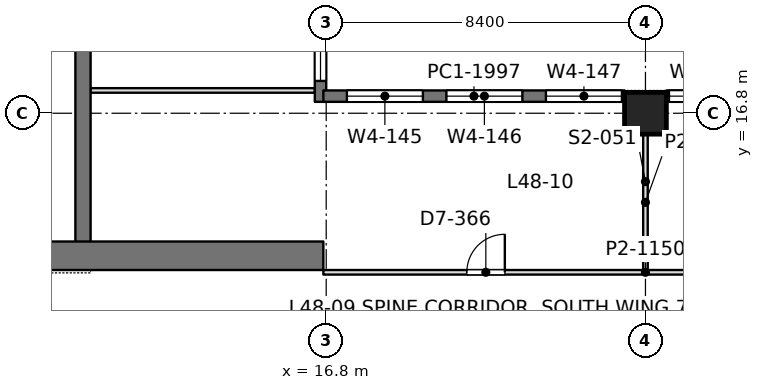
"""IFC4 building model, lengths in metres.
Left out: names, types, materials, properties, quantities, classifications, styles, units other than length and angle.
Written with IfcOpenShell. Run it as: python <this file> out.ifc"""

import sys

from ifc_helpers import new_model, si_unit, direction, frame, frame_2d, origin, origin_2d, place, context, subcontext, project, spatial, rectangle, extrude, element, fill, save


model = new_model("IFC4")
c1 = context("Model", 3, precision=1e-05, world=origin(), true_north=direction((0.0, 1.0)))
c2 = subcontext(c1, "Body", "Model", "MODEL_VIEW")
j1 = project(units=[si_unit("LENGTHUNIT", "METRE"), si_unit("PLANEANGLEUNIT", "RADIAN")], contexts=[c1])
p1 = place(None, origin())
s1 = spatial("IfcSite", under=j1, at=p1, CompositionType="ELEMENT")
p2 = place(p1, origin())
s2 = spatial("IfcBuilding", under=s1, at=p2, CompositionType="ELEMENT")
p3 = place(p2, frame((0.0, 0.0, 211.2)))
s3 = spatial("IfcBuildingStorey", under=s2, at=p3, CompositionType="ELEMENT", Elevation=211.2)
p4 = place(p3, frame((25.2, 16.8, 0.0), z_axis=(0.0, 0.0, 1.0), x_axis=(1.0, 0.0, 0.0)))
e1 = element("IfcColumn", 1, at=p4, inside=s3, PredefinedType="COLUMN", context=c2, shape_type="SweptSolid", body=[
    extrude(rectangle(XDim=1.1, YDim=1.1, at=origin_2d()), origin(), (0.0, 0.0, 1.0), 4.2),
])
p5 = place(p3, frame((-1.125, 13.05, 0.0), z_axis=(0.0, 0.0, 1.0), x_axis=(1.0, 0.0, 0.0)))
e2 = element("IfcWall", 2, at=p5, inside=s3, PredefinedType="SHEAR", context=c2, shape_type="SweptSolid", body=[
    extrude(rectangle(XDim=17.85, YDim=0.75, at=frame_2d((8.925, 0.0))), origin(), (0.0, 0.0, 1.0), 4.2),
])
p6 = place(p5, frame((8.875, 0.0, 0.0)))
e3 = element("IfcOpeningElement", 3, at=p6, cuts=e2, PredefinedType="OPENING", context=c2, shape_type="SweptSolid", body=[
    extrude(rectangle(XDim=1.8, YDim=2.4, at=frame_2d((0.9, 1.2))), frame((0.0, 0.385, 0.0), z_axis=(0.0, -1.0, 0.0), x_axis=(1.0, 0.0, 0.0)), (0.0, 0.0, 1.0), 0.77),
])
p7 = place(p3, frame((10.4, 13.05, 0.0), z_axis=(0.0, 0.0, 1.0), x_axis=(0.0, 1.0, 0.0)))
e4 = element("IfcWall", 4, at=p7, inside=s3, PredefinedType="SHEAR", context=c2, shape_type="SweptSolid", body=[
    extrude(rectangle(XDim=24.3, YDim=0.4, at=frame_2d((12.15, 0.0))), origin(), (0.0, 0.0, 1.0), 4.2),
])
p8 = place(p7, frame((15.75, 0.0, 0.0)))
e5 = element("IfcOpeningElement", 5, at=p8, cuts=e4, PredefinedType="OPENING", context=c2, shape_type="SweptSolid", body=[
    extrude(rectangle(XDim=1.1, YDim=2.2, at=frame_2d((0.55, 1.1))), frame((0.0, 0.21, 0.0), z_axis=(0.0, -1.0, 0.0), x_axis=(1.0, 0.0, 0.0)), (0.0, 0.0, 1.0), 0.42),
])
p9 = place(p7, frame((18.6, 0.0, 0.0)))
e6 = element("IfcOpeningElement", 6, at=p9, cuts=e4, PredefinedType="OPENING", context=c2, shape_type="SweptSolid", body=[
    extrude(rectangle(XDim=1.1, YDim=2.2, at=frame_2d((0.55, 1.1))), frame((0.0, 0.21, 0.0), z_axis=(0.0, -1.0, 0.0), x_axis=(1.0, 0.0, 0.0)), (0.0, 0.0, 1.0), 0.42),
])
p10 = place(p7, frame((21.45, 0.0, 0.0)))
e7 = element("IfcOpeningElement", 7, at=p10, cuts=e4, PredefinedType="OPENING", context=c2, shape_type="SweptSolid", body=[
    extrude(rectangle(XDim=1.1, YDim=2.2, at=frame_2d((0.55, 1.1))), frame((0.0, 0.21, 0.0), z_axis=(0.0, -1.0, 0.0), x_axis=(1.0, 0.0, 0.0)), (0.0, 0.0, 1.0), 0.42),
])
p11 = place(p7, frame((6.05, 0.0, 0.0)))
e8 = element("IfcOpeningElement", 8, at=p11, cuts=e4, PredefinedType="OPENING", context=c2, shape_type="SweptSolid", body=[
    extrude(rectangle(XDim=1.8, YDim=2.4, at=frame_2d((0.9, 1.2))), frame((0.0, 0.21, 0.0), z_axis=(0.0, -1.0, 0.0), x_axis=(1.0, 0.0, 0.0)), (0.0, 0.0, 1.0), 0.42),
])
p12 = place(p7, frame((11.25, 0.0, 0.0)))
e9 = element("IfcOpeningElement", 9, at=p12, cuts=e4, PredefinedType="OPENING", context=c2, shape_type="SweptSolid", body=[
    extrude(rectangle(XDim=1.8, YDim=2.4, at=frame_2d((0.9, 1.2))), frame((0.0, 0.21, 0.0), z_axis=(0.0, -1.0, 0.0), x_axis=(1.0, 0.0, 0.0)), (0.0, 0.0, 1.0), 0.42),
])
p13 = place(p3, frame((16.65, 17.1, 0.0), z_axis=(0.0, 0.0, 1.0), x_axis=(0.0, 1.0, 0.0)))
e10 = element("IfcWall", 10, at=p13, inside=s3, PredefinedType="SOLIDWALL", context=c2, shape_type="SweptSolid", body=[
    extrude(rectangle(XDim=10.7, YDim=0.3, at=frame_2d((5.35, 0.0))), origin(), (0.0, 0.0, 1.0), 4.05),
])
p14 = place(p13, frame((0.55, 0.0, 0.9)))
e11 = element("IfcOpeningElement", 11, at=p14, cuts=e10, PredefinedType="OPENING", context=c2, shape_type="SweptSolid", body=[
    extrude(rectangle(XDim=2.0, YDim=1.9, at=frame_2d((1.0, 0.95))), frame((0.0, 0.16, 0.0), z_axis=(0.0, -1.0, 0.0), x_axis=(1.0, 0.0, 0.0)), (0.0, 0.0, 1.0), 0.32),
])
p15 = place(p13, frame((2.9, 0.0, 0.9)))
e12 = element("IfcOpeningElement", 12, at=p15, cuts=e10, PredefinedType="OPENING", context=c2, shape_type="SweptSolid", body=[
    extrude(rectangle(XDim=2.0, YDim=1.9, at=frame_2d((1.0, 0.95))), frame((0.0, 0.16, 0.0), z_axis=(0.0, -1.0, 0.0), x_axis=(1.0, 0.0, 0.0)), (0.0, 0.0, 1.0), 0.32),
])
p16 = place(p13, frame((7.675, 0.0, 0.9)))
e13 = element("IfcOpeningElement", 13, at=p16, cuts=e10, PredefinedType="OPENING", context=c2, shape_type="SweptSolid", body=[
    extrude(rectangle(XDim=2.0, YDim=1.9, at=frame_2d((1.0, 0.95))), frame((0.0, 0.16, 0.0), z_axis=(0.0, -1.0, 0.0), x_axis=(1.0, 0.0, 0.0)), (0.0, 0.0, 1.0), 0.32),
])
p17 = place(p3, frame((16.725, 17.25, 0.0), z_axis=(0.0, 0.0, 1.0), x_axis=(1.0, 0.0, 0.0)))
e14 = element("IfcWall", 14, at=p17, inside=s3, PredefinedType="SOLIDWALL", context=c2, shape_type="SweptSolid", body=[
    extrude(rectangle(XDim=7.925, YDim=0.3, at=frame_2d((3.962, 0.0))), origin(), (0.0, 0.0, 1.0), 4.05),
])
p18 = place(p17, frame((0.619, 0.0, 0.9)))
e15 = element("IfcOpeningElement", 15, at=p18, cuts=e14, PredefinedType="OPENING", context=c2, shape_type="SweptSolid", body=[
    extrude(rectangle(XDim=2.0, YDim=1.9, at=frame_2d((1.0, 0.95))), frame((0.0, 0.16, 0.0), z_axis=(0.0, -1.0, 0.0), x_axis=(1.0, 0.0, 0.0)), (0.0, 0.0, 1.0), 0.32),
])
p19 = place(p17, frame((3.238, 0.0, 0.9)))
e16 = element("IfcOpeningElement", 16, at=p19, cuts=e14, PredefinedType="OPENING", context=c2, shape_type="SweptSolid", body=[
    extrude(rectangle(XDim=2.0, YDim=1.9, at=frame_2d((1.0, 0.95))), frame((0.0, 0.16, 0.0), z_axis=(0.0, -1.0, 0.0), x_axis=(1.0, 0.0, 0.0)), (0.0, 0.0, 1.0), 0.32),
])
p20 = place(p17, frame((5.856, 0.0, 0.9)))
e17 = element("IfcOpeningElement", 17, at=p20, cuts=e14, PredefinedType="OPENING", context=c2, shape_type="SweptSolid", body=[
    extrude(rectangle(XDim=2.0, YDim=1.9, at=frame_2d((1.0, 0.95))), frame((0.0, 0.16, 0.0), z_axis=(0.0, -1.0, 0.0), x_axis=(1.0, 0.0, 0.0)), (0.0, 0.0, 1.0), 0.32),
])
p21 = place(p3, frame((25.75, 17.25, 0.0), z_axis=(0.0, 0.0, 1.0), x_axis=(1.0, 0.0, 0.0)))
e18 = element("IfcWall", 18, at=p21, inside=s3, PredefinedType="SOLIDWALL", context=c2, shape_type="SweptSolid", body=[
    extrude(rectangle(XDim=7.925, YDim=0.3, at=frame_2d((3.962, 0.0))), origin(), (0.0, 0.0, 1.0), 4.05),
])
p22 = place(p21, frame((0.069, 0.0, 0.9)))
e19 = element("IfcOpeningElement", 19, at=p22, cuts=e18, PredefinedType="OPENING", context=c2, shape_type="SweptSolid", body=[
    extrude(rectangle(XDim=2.0, YDim=1.9, at=frame_2d((1.0, 0.95))), frame((0.0, 0.16, 0.0), z_axis=(0.0, -1.0, 0.0), x_axis=(1.0, 0.0, 0.0)), (0.0, 0.0, 1.0), 0.32),
])
p23 = place(p21, frame((2.688, 0.0, 0.9)))
e20 = element("IfcOpeningElement", 20, at=p23, cuts=e18, PredefinedType="OPENING", context=c2, shape_type="SweptSolid", body=[
    extrude(rectangle(XDim=2.0, YDim=1.9, at=frame_2d((1.0, 0.95))), frame((0.0, 0.16, 0.0), z_axis=(0.0, -1.0, 0.0), x_axis=(1.0, 0.0, 0.0)), (0.0, 0.0, 1.0), 0.32),
])
p24 = place(p21, frame((5.306, 0.0, 0.9)))
e21 = element("IfcOpeningElement", 21, at=p24, cuts=e18, PredefinedType="OPENING", context=c2, shape_type="SweptSolid", body=[
    extrude(rectangle(XDim=2.0, YDim=1.9, at=frame_2d((1.0, 0.95))), frame((0.0, 0.16, 0.0), z_axis=(0.0, -1.0, 0.0), x_axis=(1.0, 0.0, 0.0)), (0.0, 0.0, 1.0), 0.32),
])
p25 = place(p3, frame((10.598, 17.4, 0.0), z_axis=(0.0, 0.0, 1.0), x_axis=(1.0, 0.0, 0.0)))
e22 = element("IfcWall", 22, at=p25, inside=s3, PredefinedType="PARTITIONING", context=c2, shape_type="SweptSolid", body=[
    extrude(rectangle(XDim=5.904, YDim=0.12, at=frame_2d((2.952, 0.0))), origin(), (0.0, 0.0, 1.0), 3.55),
])
p26 = place(p3, frame((25.2, 12.658, 0.0), z_axis=(0.0, 0.0, 1.0), x_axis=(0.0, 1.0, 0.0)))
e23 = element("IfcWall", 23, at=p26, inside=s3, PredefinedType="PARTITIONING", context=c2, shape_type="SweptSolid", body=[
    extrude(rectangle(XDim=3.593, YDim=0.12, at=frame_2d((1.796, 0.0))), origin(), (0.0, 0.0, 1.0), 3.55),
])
p27 = place(p3, frame((16.725, 12.615, 0.0), z_axis=(0.0, 0.0, 1.0), x_axis=(1.0, 0.0, 0.0)))
e24 = element("IfcWall", 24, at=p27, inside=s3, PredefinedType="PARTITIONING", context=c2, shape_type="SweptSolid", body=[
    extrude(rectangle(XDim=16.95, YDim=0.12, at=frame_2d((8.475, 0.0))), origin(), (0.0, 0.0, 1.0), 3.55),
])
p28 = place(p27, frame((3.775, 0.0, 0.0)))
e25 = element("IfcOpeningElement", 25, at=p28, cuts=e24, PredefinedType="OPENING", context=c2, shape_type="SweptSolid", body=[
    extrude(rectangle(XDim=1.0, YDim=2.4, at=frame_2d((0.5, 1.2))), frame((0.0, 0.07, 0.0), z_axis=(0.0, -1.0, 0.0), x_axis=(1.0, 0.0, 0.0)), (0.0, 0.0, 1.0), 0.14),
])
p29 = place(p27, frame((12.175, 0.0, 0.0)))
e26 = element("IfcOpeningElement", 26, at=p29, cuts=e24, PredefinedType="OPENING", context=c2, shape_type="SweptSolid", body=[
    extrude(rectangle(XDim=1.0, YDim=2.4, at=frame_2d((0.5, 1.2))), frame((0.0, 0.07, 0.0), z_axis=(0.0, -1.0, 0.0), x_axis=(1.0, 0.0, 0.0)), (0.0, 0.0, 1.0), 0.14),
])
p30 = place(p14, origin())
e27 = element("IfcWindow", 27, at=p30, inside=s3, PartitioningType="SINGLE_PANEL", PredefinedType="WINDOW", context=c2, shape_type="SweptSolid", body=[
    extrude(rectangle(XDim=2.0, YDim=1.9, at=frame_2d((1.0, 0.95))), frame((0.0, 0.03, 0.0), z_axis=(0.0, -1.0, 0.0), x_axis=(1.0, 0.0, 0.0)), (0.0, 0.0, 1.0), 0.06),
])
fill(e11, e27)
p31 = place(p18, origin())
e28 = element("IfcWindow", 28, at=p31, inside=s3, PartitioningType="SINGLE_PANEL", PredefinedType="WINDOW", context=c2, shape_type="SweptSolid", body=[
    extrude(rectangle(XDim=2.0, YDim=1.9, at=frame_2d((1.0, 0.95))), frame((0.0, 0.03, 0.0), z_axis=(0.0, -1.0, 0.0), x_axis=(1.0, 0.0, 0.0)), (0.0, 0.0, 1.0), 0.06),
])
fill(e15, e28)
p32 = place(p19, origin())
e29 = element("IfcWindow", 29, at=p32, inside=s3, PartitioningType="SINGLE_PANEL", PredefinedType="WINDOW", context=c2, shape_type="SweptSolid", body=[
    extrude(rectangle(XDim=2.0, YDim=1.9, at=frame_2d((1.0, 0.95))), frame((0.0, 0.03, 0.0), z_axis=(0.0, -1.0, 0.0), x_axis=(1.0, 0.0, 0.0)), (0.0, 0.0, 1.0), 0.06),
])
fill(e16, e29)
p33 = place(p20, origin())
e30 = element("IfcWindow", 30, at=p33, inside=s3, PartitioningType="SINGLE_PANEL", PredefinedType="WINDOW", context=c2, shape_type="SweptSolid", body=[
    extrude(rectangle(XDim=2.0, YDim=1.9, at=frame_2d((1.0, 0.95))), frame((0.0, 0.03, 0.0), z_axis=(0.0, -1.0, 0.0), x_axis=(1.0, 0.0, 0.0)), (0.0, 0.0, 1.0), 0.06),
])
fill(e17, e30)
p34 = place(p22, origin())
e31 = element("IfcWindow", 31, at=p34, inside=s3, PartitioningType="SINGLE_PANEL", PredefinedType="WINDOW", context=c2, shape_type="SweptSolid", body=[
    extrude(rectangle(XDim=2.0, YDim=1.9, at=frame_2d((1.0, 0.95))), frame((0.0, 0.03, 0.0), z_axis=(0.0, -1.0, 0.0), x_axis=(1.0, 0.0, 0.0)), (0.0, 0.0, 1.0), 0.06),
])
fill(e19, e31)
p35 = place(p28, origin())
e32 = element("IfcDoor", 32, at=p35, inside=s3, OperationType="SINGLE_SWING_RIGHT", PredefinedType="DOOR", context=c2, shape_type="SweptSolid", body=[
    extrude(rectangle(XDim=1.0, YDim=2.4, at=frame_2d((0.5, 1.2))), frame((0.0, 0.025, 0.0), z_axis=(0.0, -1.0, 0.0), x_axis=(1.0, 0.0, 0.0)), (0.0, 0.0, 1.0), 0.05),
])
fill(e25, e32)
save(model, sys.argv[1])
